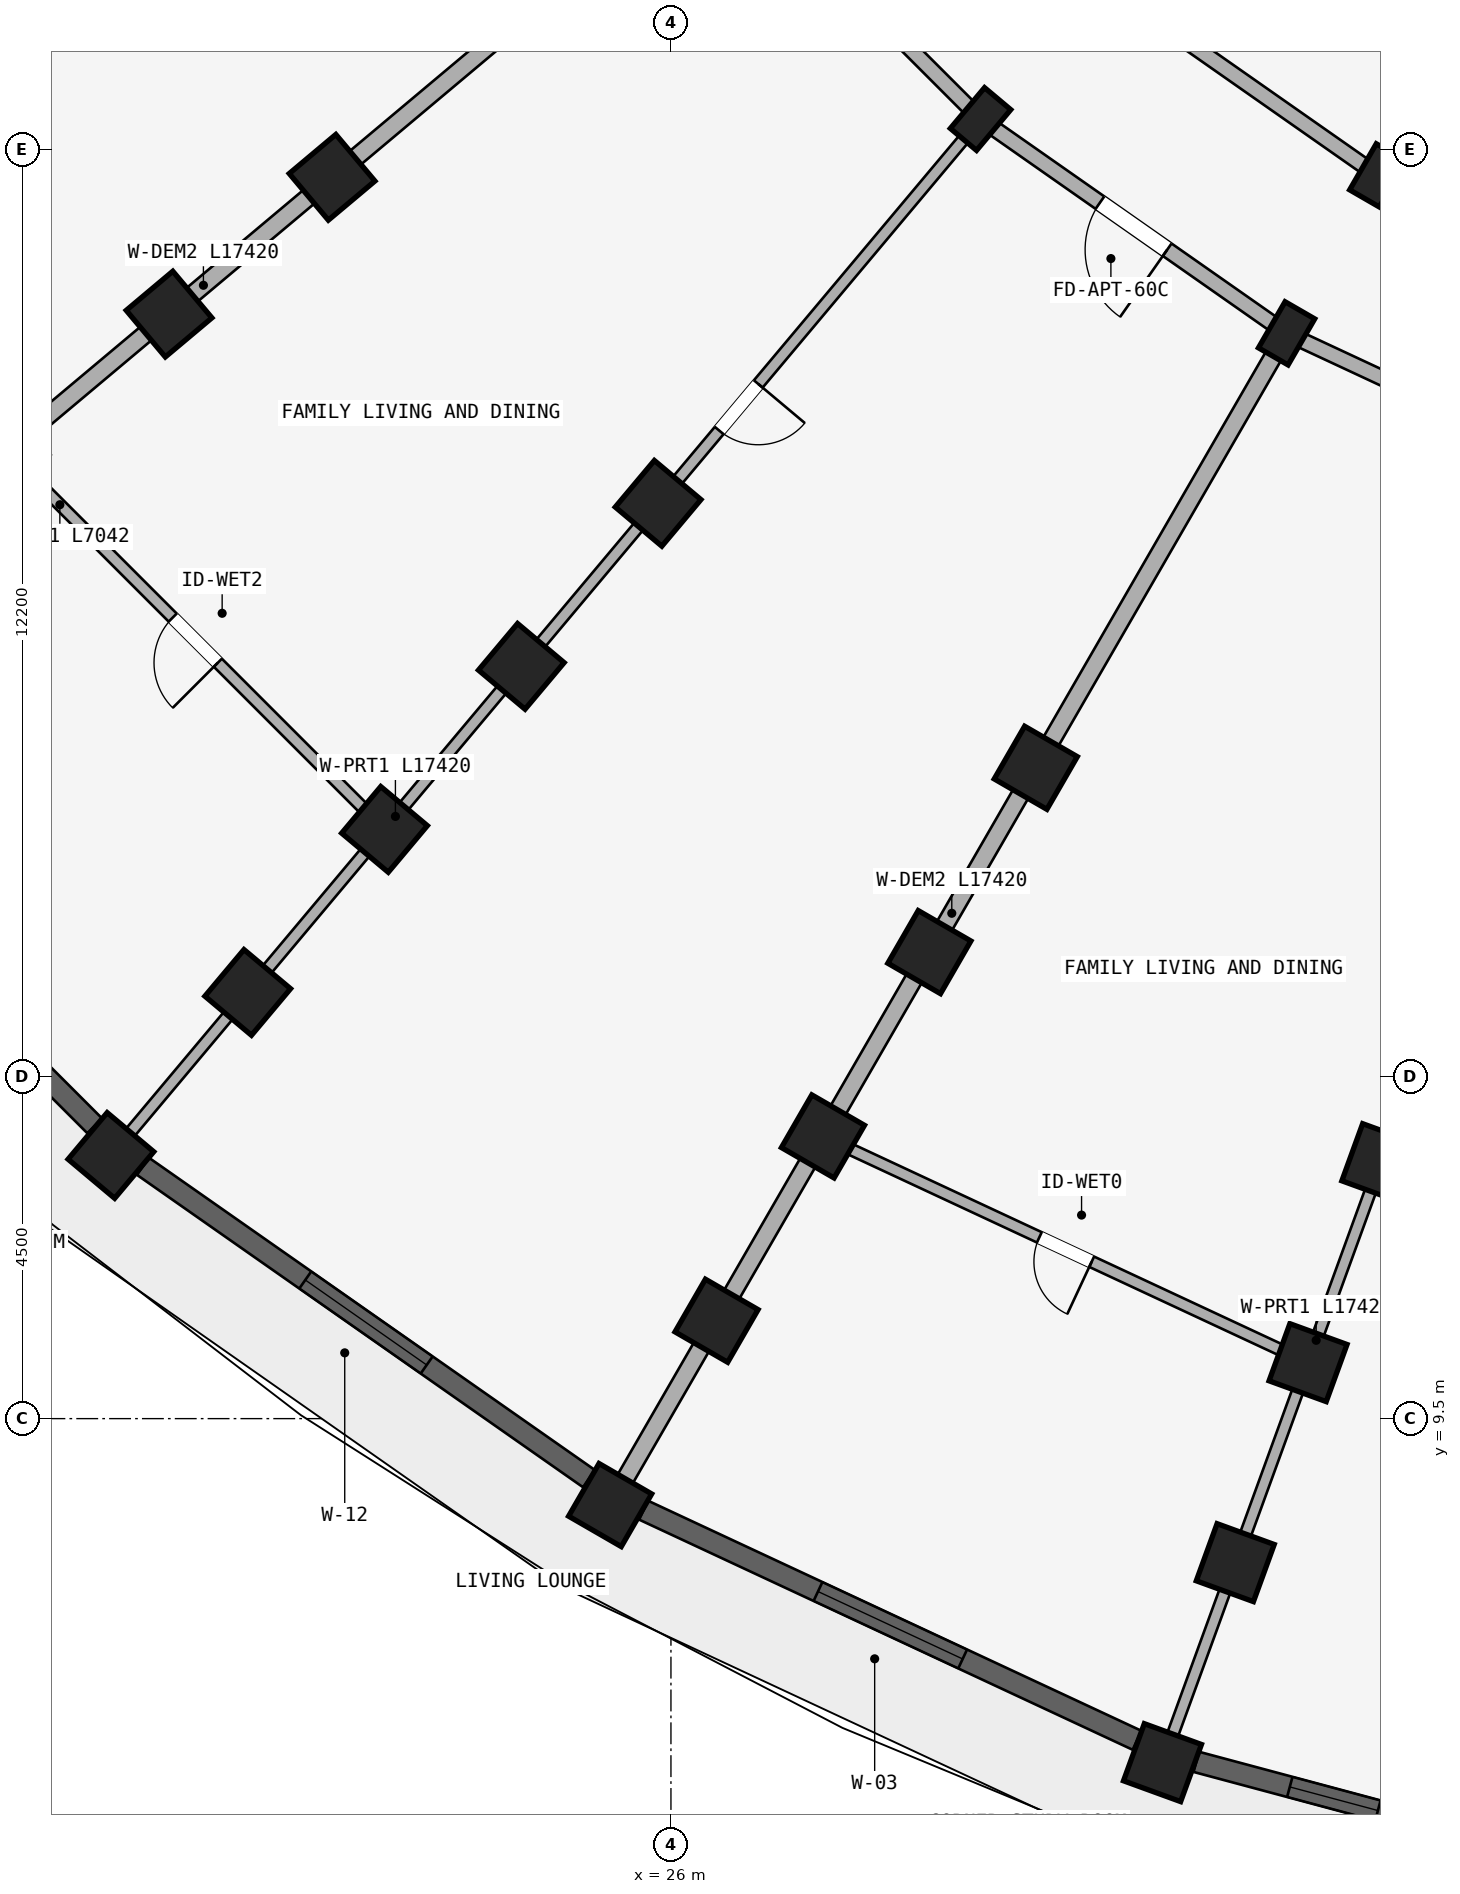
"""IFC4 building model, lengths in metres.
Left out: names, types, materials, properties, quantities, classifications, styles, units other than length and angle.
Written with IfcOpenShell. Run it as: python <this file> out.ifc"""

import sys

from ifc_helpers import new_model, si_unit, direction, frame, frame_2d, origin, origin_2d, place, context, subcontext, project, spatial, rectangle, extrude, element, fill, save


model = new_model("IFC4")
c1 = context("Model", 3, precision=1e-05, world=origin(), true_north=direction((0.0, 1.0)))
c2 = subcontext(c1, "Body", "Model", "MODEL_VIEW")
j1 = project(units=[si_unit("LENGTHUNIT", "METRE"), si_unit("PLANEANGLEUNIT", "RADIAN")], contexts=[c1])
p1 = place(None, origin())
s1 = spatial("IfcSite", under=j1, at=p1, CompositionType="ELEMENT")
p2 = place(p1, origin())
s2 = spatial("IfcBuilding", under=s1, at=p2, CompositionType="ELEMENT")
p3 = place(p2, frame((0.0, 0.0, 11.85)))
s3 = spatial("IfcBuildingStorey", under=s2, at=p3, CompositionType="ELEMENT", Elevation=11.85)
for number, where, z_axis, x_axis in (
    (1, (35.34, 12.868, 0.0), (0.0, 0.0, 1.0), (-0.94, 0.342, 0.0)),
    (2, (34.382, 10.236, 0.0), (0.0, 0.0, 1.0), (-0.94, 0.342, 0.0)),
    (3, (33.425, 7.605, 0.0), (0.0, 0.0, 1.0), (-0.94, 0.342, 0.0)),
    (4, (32.467, 4.974, 0.0), (0.0, 0.0, 1.0), (-0.94, 0.342, 0.0)),
):
    element("IfcColumn", number, at=place(p3, frame(where, z_axis=z_axis, x_axis=x_axis)), inside=s3, PredefinedType="COLUMN", context=c2, shape_type="SweptSolid", body=[
        extrude(rectangle(XDim=0.8, YDim=0.8, at=origin_2d()), origin(), (0.0, 0.0, 1.0), 2.93),
    ])
for number, where, z_axis, x_axis in (
    (5, (35.3, 25.856, 0.0), (0.0, 0.0, 1.0), (-0.866, 0.5, 0.0)),
    (6, (34.1, 23.778, 0.0), (0.0, 0.0, 1.0), (-0.866, 0.5, 0.0)),
):
    element("IfcColumn", number, at=place(p3, frame(where, z_axis=z_axis, x_axis=x_axis)), inside=s3, PredefinedType="COLUMN", context=c2, shape_type="SweptSolid", body=[
        extrude(rectangle(XDim=0.45, YDim=0.7, at=origin_2d()), origin(), (0.0, 0.0, 1.0), 2.93),
    ])
for number, where, z_axis, x_axis in (
    (7, (30.8, 18.062, 0.0), (0.0, 0.0, 1.0), (-0.866, 0.5, 0.0)),
    (8, (29.4, 15.637, 0.0), (0.0, 0.0, 1.0), (-0.866, 0.5, 0.0)),
    (9, (28.0, 13.213, 0.0), (0.0, 0.0, 1.0), (-0.866, 0.5, 0.0)),
    (10, (26.6, 10.788, 0.0), (0.0, 0.0, 1.0), (-0.866, 0.5, 0.0)),
    (11, (25.2, 8.363, 0.0), (0.0, 0.0, 1.0), (-0.866, 0.5, 0.0)),
):
    element("IfcColumn", number, at=place(p3, frame(where, z_axis=z_axis, x_axis=x_axis)), inside=s3, PredefinedType="COLUMN", context=c2, shape_type="SweptSolid", body=[
        extrude(rectangle(XDim=0.8, YDim=0.8, at=origin_2d()), origin(), (0.0, 0.0, 1.0), 2.93),
    ])
p4 = place(p3, frame((30.073, 26.598, 0.0), z_axis=(0.0, 0.0, 1.0), x_axis=(-0.766044443119, 0.642787609687, 0.0)))
e12 = element("IfcColumn", 12, at=p4, inside=s3, PredefinedType="COLUMN", context=c2, shape_type="SweptSolid", body=[
    extrude(rectangle(XDim=0.45, YDim=0.7, at=origin_2d()), origin(), (0.0, 0.0, 1.0), 2.93),
])
for number, where, z_axis, x_axis in (
    (13, (25.831, 21.542, 0.0), (0.0, 0.0, 1.0), (-0.766, 0.643, 0.0)),
    (14, (24.031, 19.397, 0.0), (0.0, 0.0, 1.0), (-0.766, 0.643, 0.0)),
    (15, (22.231, 17.252, 0.0), (0.0, 0.0, 1.0), (-0.766, 0.643, 0.0)),
    (16, (20.432, 15.107, 0.0), (0.0, 0.0, 1.0), (-0.766, 0.643, 0.0)),
    (17, (18.632, 12.962, 0.0), (0.0, 0.0, 1.0), (-0.766, 0.643, 0.0)),
    (18, (21.542, 25.831, 0.0), (0.0, 0.0, 1.0), (-0.643, 0.766, 0.0)),
    (19, (19.397, 24.031, 0.0), (0.0, 0.0, 1.0), (-0.643, 0.766, 0.0)),
):
    element("IfcColumn", number, at=place(p3, frame(where, z_axis=z_axis, x_axis=x_axis)), inside=s3, PredefinedType="COLUMN", context=c2, shape_type="SweptSolid", body=[
        extrude(rectangle(XDim=0.8, YDim=0.8, at=origin_2d()), origin(), (0.0, 0.0, 1.0), 2.93),
    ])
p5 = place(p3, frame((39.376, 23.956, 0.0), z_axis=(0.0, 0.0, 1.0), x_axis=(-0.906307919131, 0.422617978463, 0.0)))
e20 = element("IfcWall", 20, at=p5, inside=s3, PredefinedType="STANDARD", context=c2, shape_type="SweptSolid", body=[
    extrude(rectangle(XDim=4.497, YDim=0.2, at=frame_2d((2.249, 0.0))), origin(), (0.0, 0.0, 1.0), 2.372),
])
p6 = place(p5, frame((1.709, 0.0, 0.0)))
e21 = element("IfcOpeningElement", 21, at=p6, cuts=e20, PredefinedType="OPENING", context=c2, shape_type="SweptSolid", body=[
    extrude(rectangle(XDim=1.08, YDim=2.15, at=frame_2d((0.54, 1.075))), frame((0.0, 0.11, 0.0), z_axis=(0.0, -1.0, 0.0), x_axis=(1.0, 0.0, 0.0)), (0.0, 0.0, 1.0), 0.22),
])
p7 = place(p3, frame((38.555, 21.701, 0.0), z_axis=(0.0, 0.0, 1.0), x_axis=(-0.906302381024, 0.422629854778, 0.0)))
e22 = element("IfcWall", 22, at=p7, inside=s3, PredefinedType="STANDARD", context=c2, shape_type="SweptSolid", body=[
    extrude(rectangle(XDim=4.915, YDim=0.2, at=frame_2d((2.458, 0.0))), origin(), (0.0, 0.0, 1.0), 2.372),
])
p8 = place(p3, frame((35.3, 25.856, 0.0), z_axis=(0.0, 0.0, 1.0), x_axis=(-0.819155404658, 0.573571637217, 0.0)))
e23 = element("IfcWall", 23, at=p8, inside=s3, PredefinedType="STANDARD", context=c2, shape_type="SweptSolid", body=[
    extrude(rectangle(XDim=4.497, YDim=0.2, at=frame_2d((2.249, 0.0))), origin(), (0.0, 0.0, 1.0), 2.372),
])
p9 = place(p3, frame((34.1, 23.778, 0.0), z_axis=(0.0, 0.0, 1.0), x_axis=(-0.819140911474, 0.573592335331, 0.0)))
e24 = element("IfcWall", 24, at=p9, inside=s3, PredefinedType="STANDARD", context=c2, shape_type="SweptSolid", body=[
    extrude(rectangle(XDim=4.916, YDim=0.2, at=frame_2d((2.458, 0.0))), origin(), (0.0, 0.0, 1.0), 2.372),
])
p10 = place(p9, frame((1.918, 0.0, 0.0)))
e25 = element("IfcOpeningElement", 25, at=p10, cuts=e24, PredefinedType="OPENING", context=c2, shape_type="SweptSolid", body=[
    extrude(rectangle(XDim=1.08, YDim=2.15, at=frame_2d((0.54, 1.075))), frame((0.0, 0.11, 0.0), z_axis=(0.0, -1.0, 0.0), x_axis=(1.0, 0.0, 0.0)), (0.0, 0.0, 1.0), 0.22),
])
p11 = place(p3, frame((30.073, 26.598, 0.0), z_axis=(0.0, 0.0, 1.0), x_axis=(-0.707106781187, 0.707106781187, 0.0)))
e26 = element("IfcWall", 26, at=p11, inside=s3, PredefinedType="STANDARD", context=c2, shape_type="SweptSolid", body=[
    extrude(rectangle(XDim=4.916, YDim=0.2, at=frame_2d((2.458, 0.0))), origin(), (0.0, 0.0, 1.0), 2.372),
])
p12 = place(p3, frame((38.521, 21.607, 0.0), z_axis=(0.0, 0.0, 1.0), x_axis=(-0.342022120477, -0.939691901159, 0.0)))
e27 = element("IfcWall", 27, at=p12, inside=s3, PredefinedType="PARTITIONING", context=c2, shape_type="SweptSolid", body=[
    extrude(rectangle(XDim=17.42, YDim=0.15, at=frame_2d((8.71, 0.0))), origin(), (0.0, 0.0, 1.0), 2.372),
])
p13 = place(p12, frame((4.45, 0.0, 0.0)))
e28 = element("IfcOpeningElement", 28, at=p13, cuts=e27, PredefinedType="OPENING", context=c2, shape_type="SweptSolid", body=[
    extrude(rectangle(XDim=0.8, YDim=2.1, at=frame_2d((0.4, 1.05))), frame((0.0, 0.085, 0.0), z_axis=(0.0, -1.0, 0.0), x_axis=(1.0, 0.0, 0.0)), (0.0, 0.0, 1.0), 0.17),
])
p14 = place(p3, frame((38.7, 31.746, 0.0), z_axis=(0.0, 0.0, 1.0), x_axis=(-0.499997969693, -0.866026575979, 0.0)))
e29 = element("IfcWall", 29, at=p14, inside=s3, PredefinedType="PARTITIONING", context=c2, shape_type="SweptSolid", body=[
    extrude(rectangle(XDim=6.75, YDim=0.15, at=frame_2d((3.375, 0.0))), origin(), (0.0, 0.0, 1.0), 2.372),
])
p15 = place(p14, frame((3.242, 0.0, 0.0)))
e30 = element("IfcOpeningElement", 30, at=p15, cuts=e29, PredefinedType="OPENING", context=c2, shape_type="SweptSolid", body=[
    extrude(rectangle(XDim=0.94, YDim=2.1, at=frame_2d((0.47, 1.05))), frame((0.0, 0.085, 0.0), z_axis=(0.0, -1.0, 0.0), x_axis=(1.0, 0.0, 0.0)), (0.0, 0.0, 1.0), 0.17),
])
p16 = place(p3, frame((34.05, 23.691, 0.0), z_axis=(0.0, 0.0, 1.0), x_axis=(-0.499997843263, -0.866026648973, 0.0)))
e31 = element("IfcWall", 31, at=p16, inside=s3, PredefinedType="STANDARD", context=c2, shape_type="SweptSolid", body=[
    extrude(rectangle(XDim=17.42, YDim=0.23, at=frame_2d((8.71, 0.0))), origin(), (0.0, 0.0, 1.0), 2.372),
])
p17 = place(p3, frame((30.009, 26.521, 0.0), z_axis=(0.0, 0.0, 1.0), x_axis=(-0.642784757967, -0.766046835987, 0.0)))
e32 = element("IfcWall", 32, at=p17, inside=s3, PredefinedType="PARTITIONING", context=c2, shape_type="SweptSolid", body=[
    extrude(rectangle(XDim=17.42, YDim=0.15, at=frame_2d((8.71, 0.0))), origin(), (0.0, 0.0, 1.0), 2.372),
])
p18 = place(p17, frame((4.45, 0.0, 0.0)))
e33 = element("IfcOpeningElement", 33, at=p18, cuts=e32, PredefinedType="OPENING", context=c2, shape_type="SweptSolid", body=[
    extrude(rectangle(XDim=0.8, YDim=2.1, at=frame_2d((0.4, 1.05))), frame((0.0, 0.085, 0.0), z_axis=(0.0, -1.0, 0.0), x_axis=(1.0, 0.0, 0.0)), (0.0, 0.0, 1.0), 0.17),
])
p19 = place(p3, frame((26.521, 30.009, 0.0), z_axis=(0.0, 0.0, 1.0), x_axis=(-0.766046835987, -0.642784757967, 0.0)))
e34 = element("IfcWall", 34, at=p19, inside=s3, PredefinedType="STANDARD", context=c2, shape_type="SweptSolid", body=[
    extrude(rectangle(XDim=17.42, YDim=0.23, at=frame_2d((8.71, 0.0))), origin(), (0.0, 0.0, 1.0), 2.372),
])
p20 = place(p3, frame((23.691, 34.05, 0.0), z_axis=(0.0, 0.0, 1.0), x_axis=(-0.866026648973, -0.499997843263, 0.0)))
e35 = element("IfcWall", 35, at=p20, inside=s3, PredefinedType="PARTITIONING", context=c2, shape_type="SweptSolid", body=[
    extrude(rectangle(XDim=17.42, YDim=0.15, at=frame_2d((8.71, 0.0))), origin(), (0.0, 0.0, 1.0), 2.372),
])
p21 = place(p20, frame((4.45, 0.0, 0.0)))
e36 = element("IfcOpeningElement", 36, at=p21, cuts=e35, PredefinedType="OPENING", context=c2, shape_type="SweptSolid", body=[
    extrude(rectangle(XDim=0.8, YDim=2.1, at=frame_2d((0.4, 1.05))), frame((0.0, 0.085, 0.0), z_axis=(0.0, -1.0, 0.0), x_axis=(1.0, 0.0, 0.0)), (0.0, 0.0, 1.0), 0.17),
])
p22 = place(p3, frame((34.382, 10.236, 0.0), z_axis=(0.0, 0.0, 1.0), x_axis=(-0.906297360311, 0.422640621205, 0.0)))
e37 = element("IfcWall", 37, at=p22, inside=s3, PredefinedType="PLUMBINGWALL", context=c2, shape_type="SweptSolid", body=[
    extrude(rectangle(XDim=7.042, YDim=0.15, at=frame_2d((3.521, 0.0))), origin(), (0.0, 0.0, 1.0), 2.372),
])
p23 = place(p22, frame((3.141, 0.0, 0.0)))
e38 = element("IfcOpeningElement", 38, at=p23, cuts=e37, PredefinedType="OPENING", context=c2, shape_type="SweptSolid", body=[
    extrude(rectangle(XDim=0.76, YDim=2.05, at=frame_2d((0.38, 1.025))), frame((0.0, 0.085, 0.0), z_axis=(0.0, -1.0, 0.0), x_axis=(1.0, 0.0, 0.0)), (0.0, 0.0, 1.0), 0.17),
])
p24 = place(p3, frame((22.231, 17.252, 0.0), z_axis=(0.0, 0.0, 1.0), x_axis=(-0.707106781187, 0.707106781187, 0.0)))
e39 = element("IfcWall", 39, at=p24, inside=s3, PredefinedType="PLUMBINGWALL", context=c2, shape_type="SweptSolid", body=[
    extrude(rectangle(XDim=7.042, YDim=0.15, at=frame_2d((3.521, 0.0))), origin(), (0.0, 0.0, 1.0), 2.372),
])
p25 = place(p24, frame((3.101, 0.0, 0.0)))
e40 = element("IfcOpeningElement", 40, at=p25, cuts=e39, PredefinedType="OPENING", context=c2, shape_type="SweptSolid", body=[
    extrude(rectangle(XDim=0.84, YDim=2.1, at=frame_2d((0.42, 1.05))), frame((0.0, 0.085, 0.0), z_axis=(0.0, -1.0, 0.0), x_axis=(1.0, 0.0, 0.0)), (0.0, 0.0, 1.0), 0.17),
])
p26 = place(p3, frame((39.832, 3.13, 0.0), z_axis=(0.0, 0.0, 1.0), x_axis=(-0.965923712619, 0.258826933296, 0.0)))
e41 = element("IfcWall", 41, at=p26, inside=s3, PredefinedType="STANDARD", context=c2, shape_type="SweptSolid", body=[
    extrude(rectangle(XDim=7.164, YDim=0.275, at=frame_2d((3.582, 0.0))), origin(), (0.0, 0.0, 1.0), 2.372),
])
p27 = place(p26, frame((4.69, 0.0, 0.522)))
e42 = element("IfcOpeningElement", 42, at=p27, cuts=e41, PredefinedType="OPENING", context=c2, shape_type="SweptSolid", body=[
    extrude(rectangle(XDim=1.2, YDim=1.5, at=frame_2d((0.6, 0.75))), frame((0.0, 0.147, 0.0), z_axis=(0.0, -1.0, 0.0), x_axis=(1.0, 0.0, 0.0)), (0.0, 0.0, 1.0), 0.295),
])
p28 = place(p26, frame((1.907, 0.0, 0.0)))
e43 = element("IfcOpeningElement", 43, at=p28, cuts=e41, PredefinedType="OPENING", context=c2, shape_type="SweptSolid", body=[
    extrude(rectangle(XDim=1.2, YDim=2.15, at=frame_2d((0.6, 1.075))), frame((0.0, 0.147, 0.0), z_axis=(0.0, -1.0, 0.0), x_axis=(1.0, 0.0, 0.0)), (0.0, 0.0, 1.0), 0.295),
])
p29 = place(p3, frame((32.133, 5.268, 0.0), z_axis=(0.0, 0.0, 1.0), x_axis=(-0.906300636296, 0.422633596215, 0.0)))
e44 = element("IfcWall", 44, at=p29, inside=s3, PredefinedType="STANDARD", context=c2, shape_type="SweptSolid", body=[
    extrude(rectangle(XDim=7.164, YDim=0.275, at=frame_2d((3.582, 0.0))), origin(), (0.0, 0.0, 1.0), 2.372),
])
p30 = place(p29, frame((2.532, 0.0, 0.372)))
e45 = element("IfcOpeningElement", 45, at=p30, cuts=e44, PredefinedType="OPENING", context=c2, shape_type="SweptSolid", body=[
    extrude(rectangle(XDim=2.1, YDim=1.8, at=frame_2d((1.05, 0.9))), frame((0.0, 0.147, 0.0), z_axis=(0.0, -1.0, 0.0), x_axis=(1.0, 0.0, 0.0)), (0.0, 0.0, 1.0), 0.295),
])
p31 = place(p3, frame((24.922, 8.71, 0.0), z_axis=(0.0, 0.0, 1.0), x_axis=(-0.819161471697, 0.573562972382, 0.0)))
e46 = element("IfcWall", 46, at=p31, inside=s3, PredefinedType="STANDARD", context=c2, shape_type="SweptSolid", body=[
    extrude(rectangle(XDim=7.164, YDim=0.275, at=frame_2d((3.582, 0.0))), origin(), (0.0, 0.0, 1.0), 2.372),
])
p32 = place(p31, frame((2.607, 0.0, 0.322)))
e47 = element("IfcOpeningElement", 47, at=p32, cuts=e46, PredefinedType="OPENING", context=c2, shape_type="SweptSolid", body=[
    extrude(rectangle(XDim=1.95, YDim=1.85, at=frame_2d((0.975, 0.925))), frame((0.0, 0.147, 0.0), z_axis=(0.0, -1.0, 0.0), x_axis=(1.0, 0.0, 0.0)), (0.0, 0.0, 1.0), 0.295),
])
p33 = place(p3, frame((18.418, 13.352, 0.0), z_axis=(0.0, 0.0, 1.0), x_axis=(-0.707106781187, 0.707106781187, 0.0)))
e48 = element("IfcWall", 48, at=p33, inside=s3, PredefinedType="STANDARD", context=c2, shape_type="SweptSolid", body=[
    extrude(rectangle(XDim=7.164, YDim=0.275, at=frame_2d((3.582, 0.0))), origin(), (0.0, 0.0, 1.0), 2.372),
])
p34 = place(p33, frame((4.69, 0.0, 0.522)))
e49 = element("IfcOpeningElement", 49, at=p34, cuts=e48, PredefinedType="OPENING", context=c2, shape_type="SweptSolid", body=[
    extrude(rectangle(XDim=1.2, YDim=1.5, at=frame_2d((0.6, 0.75))), frame((0.0, 0.147, 0.0), z_axis=(0.0, -1.0, 0.0), x_axis=(1.0, 0.0, 0.0)), (0.0, 0.0, 1.0), 0.295),
])
p35 = place(p33, frame((1.907, 0.0, 0.0)))
e50 = element("IfcOpeningElement", 50, at=p35, cuts=e48, PredefinedType="OPENING", context=c2, shape_type="SweptSolid", body=[
    extrude(rectangle(XDim=1.2, YDim=2.15, at=frame_2d((0.6, 1.075))), frame((0.0, 0.147, 0.0), z_axis=(0.0, -1.0, 0.0), x_axis=(1.0, 0.0, 0.0)), (0.0, 0.0, 1.0), 0.295),
])
p36 = place(p27, origin())
e51 = element("IfcWindow", 51, at=p36, inside=s3, PartitioningType="SINGLE_PANEL", PredefinedType="WINDOW", context=c2, shape_type="SweptSolid", body=[
    extrude(rectangle(XDim=1.2, YDim=1.5, at=frame_2d((0.6, 0.75))), frame((0.0, 0.03, 0.0), z_axis=(0.0, -1.0, 0.0), x_axis=(1.0, 0.0, 0.0)), (0.0, 0.0, 1.0), 0.06),
])
fill(e42, e51)
p37 = place(p30, origin())
e52 = element("IfcWindow", 52, at=p37, inside=s3, PartitioningType="TRIPLE_PANEL_VERTICAL", PredefinedType="WINDOW", context=c2, shape_type="SweptSolid", body=[
    extrude(rectangle(XDim=2.1, YDim=1.8, at=frame_2d((1.05, 0.9))), frame((0.0, 0.03, 0.0), z_axis=(0.0, -1.0, 0.0), x_axis=(1.0, 0.0, 0.0)), (0.0, 0.0, 1.0), 0.06),
])
fill(e45, e52)
p38 = place(p32, origin())
e53 = element("IfcWindow", 53, at=p38, inside=s3, PartitioningType="DOUBLE_PANEL_VERTICAL", PredefinedType="WINDOW", context=c2, shape_type="SweptSolid", body=[
    extrude(rectangle(XDim=1.95, YDim=1.85, at=frame_2d((0.975, 0.925))), frame((0.0, 0.03, 0.0), z_axis=(0.0, -1.0, 0.0), x_axis=(1.0, 0.0, 0.0)), (0.0, 0.0, 1.0), 0.06),
])
fill(e47, e53)
p39 = place(p18, frame((0.8, 0.0, 0.0), z_axis=(0.0, 0.0, 1.0), x_axis=(-1.0, 0.0, 0.0)))
e54 = element("IfcDoor", 54, at=p39, inside=s3, OperationType="SINGLE_SWING_RIGHT", PredefinedType="DOOR", context=c2, shape_type="SweptSolid", body=[
    extrude(rectangle(XDim=0.8, YDim=2.1, at=frame_2d((0.4, 1.05))), frame((0.0, 0.025, 0.0), z_axis=(0.0, -1.0, 0.0), x_axis=(1.0, 0.0, 0.0)), (0.0, 0.0, 1.0), 0.05),
])
fill(e33, e54)
p40 = place(p23, origin())
e55 = element("IfcDoor", 55, at=p40, inside=s3, OperationType="SINGLE_SWING_LEFT", PredefinedType="DOOR", context=c2, shape_type="SweptSolid", body=[
    extrude(rectangle(XDim=0.76, YDim=2.05, at=frame_2d((0.38, 1.025))), frame((0.0, 0.025, 0.0), z_axis=(0.0, -1.0, 0.0), x_axis=(1.0, 0.0, 0.0)), (0.0, 0.0, 1.0), 0.05),
])
fill(e38, e55)
p41 = place(p10, frame((1.08, 0.0, 0.0), z_axis=(0.0, 0.0, 1.0), x_axis=(-1.0, 0.0, 0.0)))
e56 = element("IfcDoor", 56, at=p41, inside=s3, OperationType="SINGLE_SWING_RIGHT", PredefinedType="DOOR", context=c2, shape_type="SweptSolid", body=[
    extrude(rectangle(XDim=1.08, YDim=2.15, at=frame_2d((0.54, 1.075))), frame((0.0, 0.025, 0.0), z_axis=(0.0, -1.0, 0.0), x_axis=(1.0, 0.0, 0.0)), (0.0, 0.0, 1.0), 0.05),
])
fill(e25, e56)
p42 = place(p25, origin())
e57 = element("IfcDoor", 57, at=p42, inside=s3, OperationType="SINGLE_SWING_LEFT", PredefinedType="DOOR", context=c2, shape_type="SweptSolid", body=[
    extrude(rectangle(XDim=0.84, YDim=2.1, at=frame_2d((0.42, 1.05))), frame((0.0, 0.025, 0.0), z_axis=(0.0, -1.0, 0.0), x_axis=(1.0, 0.0, 0.0)), (0.0, 0.0, 1.0), 0.05),
])
fill(e40, e57)
save(model, sys.argv[1])
